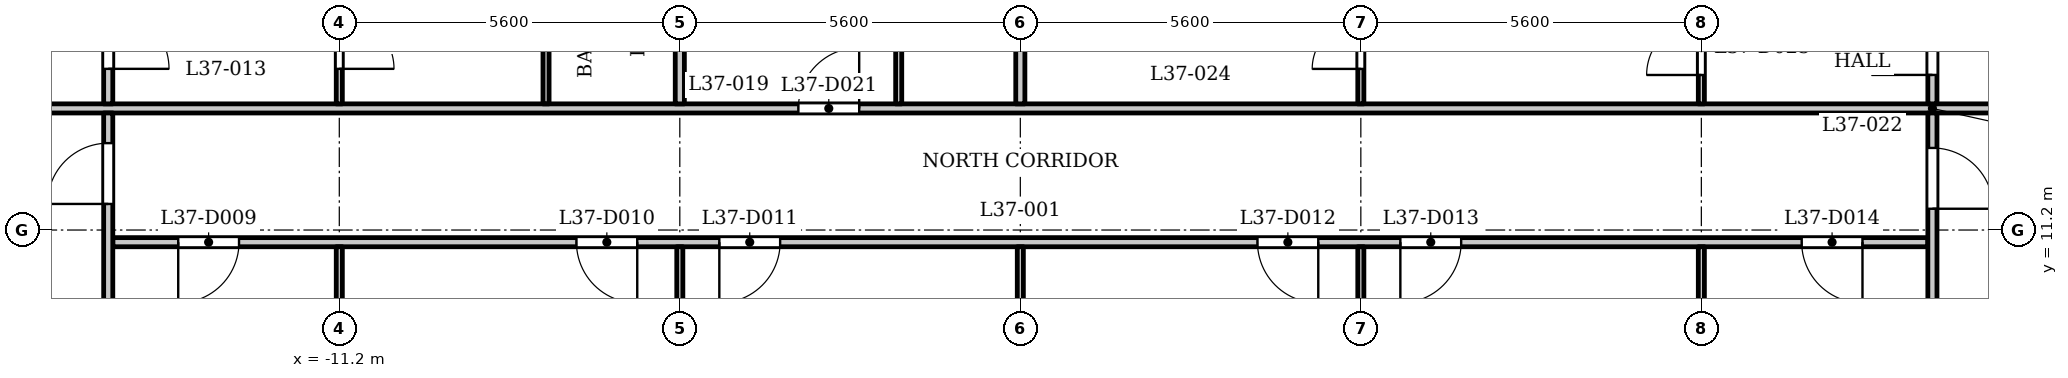
"""IFC4 building model, lengths in metres.
Left out: names, types, materials, properties, quantities, classifications, styles, units other than length and angle.
Written with IfcOpenShell. Run it as: python <this file> out.ifc"""

import sys

from ifc_helpers import new_model, si_unit, direction, frame, frame_2d, origin, place, context, subcontext, project, spatial, rectangle, extrude, element, fill, save


model = new_model("IFC4")
c1 = context("Model", 3, precision=1e-05, world=origin(), true_north=direction((0.0, 1.0)))
c2 = subcontext(c1, "Body", "Model", "MODEL_VIEW")
j1 = project(units=[si_unit("LENGTHUNIT", "METRE"), si_unit("PLANEANGLEUNIT", "RADIAN")], contexts=[c1])
p1 = place(None, origin())
s1 = spatial("IfcSite", under=j1, at=p1, CompositionType="ELEMENT")
p2 = place(p1, origin())
s2 = spatial("IfcBuilding", under=s1, at=p2, CompositionType="ELEMENT")
p3 = place(p2, frame((0.0, 0.0, 146.6)))
s3 = spatial("IfcBuildingStorey", under=s2, at=p3, CompositionType="ELEMENT", Elevation=146.6)
p4 = place(p3, frame((-14.925, 11.0, 0.0), z_axis=(0.0, 0.0, 1.0), x_axis=(1.0, 0.0, 0.0)))
e1 = element("IfcWall", 1, at=p4, inside=s3, PredefinedType="PARTITIONING", context=c2, shape_type="SweptSolid", body=[
    extrude(rectangle(XDim=29.85, YDim=0.15, at=frame_2d((14.925, 0.0))), origin(), (0.0, 0.0, 1.0), 3.2),
])
p5 = place(p4, frame((1.076, 0.0, 0.0)))
e2 = element("IfcOpeningElement", 2, at=p5, cuts=e1, PredefinedType="OPENING", context=c2, shape_type="SweptSolid", body=[
    extrude(rectangle(XDim=1.0, YDim=2.1, at=frame_2d((0.5, 1.05))), frame((0.0, 0.085, 0.0), z_axis=(0.0, -1.0, 0.0), x_axis=(1.0, 0.0, 0.0)), (0.0, 0.0, 1.0), 0.17),
])
p6 = place(p4, frame((7.625, 0.0, 0.0)))
e3 = element("IfcOpeningElement", 3, at=p6, cuts=e1, PredefinedType="OPENING", context=c2, shape_type="SweptSolid", body=[
    extrude(rectangle(XDim=1.0, YDim=2.1, at=frame_2d((0.5, 1.05))), frame((0.0, 0.085, 0.0), z_axis=(0.0, -1.0, 0.0), x_axis=(1.0, 0.0, 0.0)), (0.0, 0.0, 1.0), 0.17),
])
p7 = place(p4, frame((9.975, 0.0, 0.0)))
e4 = element("IfcOpeningElement", 4, at=p7, cuts=e1, PredefinedType="OPENING", context=c2, shape_type="SweptSolid", body=[
    extrude(rectangle(XDim=1.0, YDim=2.1, at=frame_2d((0.5, 1.05))), frame((0.0, 0.085, 0.0), z_axis=(0.0, -1.0, 0.0), x_axis=(1.0, 0.0, 0.0)), (0.0, 0.0, 1.0), 0.17),
])
p8 = place(p4, frame((18.825, 0.0, 0.0)))
e5 = element("IfcOpeningElement", 5, at=p8, cuts=e1, PredefinedType="OPENING", context=c2, shape_type="SweptSolid", body=[
    extrude(rectangle(XDim=1.0, YDim=2.1, at=frame_2d((0.5, 1.05))), frame((0.0, 0.085, 0.0), z_axis=(0.0, -1.0, 0.0), x_axis=(1.0, 0.0, 0.0)), (0.0, 0.0, 1.0), 0.17),
])
p9 = place(p4, frame((21.175, 0.0, 0.0)))
e6 = element("IfcOpeningElement", 6, at=p9, cuts=e1, PredefinedType="OPENING", context=c2, shape_type="SweptSolid", body=[
    extrude(rectangle(XDim=1.0, YDim=2.1, at=frame_2d((0.5, 1.05))), frame((0.0, 0.085, 0.0), z_axis=(0.0, -1.0, 0.0), x_axis=(1.0, 0.0, 0.0)), (0.0, 0.0, 1.0), 0.17),
])
p10 = place(p4, frame((27.775, 0.0, 0.0)))
e7 = element("IfcOpeningElement", 7, at=p10, cuts=e1, PredefinedType="OPENING", context=c2, shape_type="SweptSolid", body=[
    extrude(rectangle(XDim=1.0, YDim=2.1, at=frame_2d((0.5, 1.05))), frame((0.0, 0.085, 0.0), z_axis=(0.0, -1.0, 0.0), x_axis=(1.0, 0.0, 0.0)), (0.0, 0.0, 1.0), 0.17),
])
p11 = place(p3, frame((-17.4, 13.2, 0.0), z_axis=(0.0, 0.0, 1.0), x_axis=(1.0, 0.0, 0.0)))
e8 = element("IfcWall", 8, at=p11, inside=s3, PredefinedType="PARTITIONING", context=c2, shape_type="SweptSolid", body=[
    extrude(rectangle(XDim=34.8, YDim=0.15, at=frame_2d((17.4, 0.0))), origin(), (0.0, 0.0, 1.0), 3.2),
])
p12 = place(p11, frame((0.25, 0.0, 0.0)))
e9 = element("IfcOpeningElement", 9, at=p12, cuts=e8, PredefinedType="OPENING", context=c2, shape_type="SweptSolid", body=[
    extrude(rectangle(XDim=1.0, YDim=2.1, at=frame_2d((0.5, 1.05))), frame((0.0, 0.085, 0.0), z_axis=(0.0, -1.0, 0.0), x_axis=(1.0, 0.0, 0.0)), (0.0, 0.0, 1.0), 0.17),
])
p13 = place(p11, frame((33.65, 0.0, 0.0)))
e10 = element("IfcOpeningElement", 10, at=p13, cuts=e8, PredefinedType="OPENING", context=c2, shape_type="SweptSolid", body=[
    extrude(rectangle(XDim=1.0, YDim=2.1, at=frame_2d((0.5, 1.05))), frame((0.0, 0.085, 0.0), z_axis=(0.0, -1.0, 0.0), x_axis=(1.0, 0.0, 0.0)), (0.0, 0.0, 1.0), 0.17),
])
p14 = place(p11, frame((13.75, 0.0, 0.0)))
e11 = element("IfcOpeningElement", 11, at=p14, cuts=e8, PredefinedType="OPENING", context=c2, shape_type="SweptSolid", body=[
    extrude(rectangle(XDim=1.0, YDim=2.1, at=frame_2d((0.5, 1.05))), frame((0.0, 0.085, 0.0), z_axis=(0.0, -1.0, 0.0), x_axis=(1.0, 0.0, 0.0)), (0.0, 0.0, 1.0), 0.17),
])
p15 = place(p3, frame((-15.0, 6.769, 0.0), z_axis=(0.0, 0.0, 1.0), x_axis=(0.0, 1.0, 0.0)))
e12 = element("IfcWall", 12, at=p15, inside=s3, PredefinedType="PARTITIONING", context=c2, shape_type="SweptSolid", body=[
    extrude(rectangle(XDim=6.356, YDim=0.15, at=frame_2d((3.178, 0.0))), origin(), (0.0, 0.0, 1.0), 3.2),
])
p16 = place(p15, frame((4.86, 0.0, 0.0)))
e13 = element("IfcOpeningElement", 13, at=p16, cuts=e12, PredefinedType="OPENING", context=c2, shape_type="SweptSolid", body=[
    extrude(rectangle(XDim=1.0, YDim=2.1, at=frame_2d((0.5, 1.05))), frame((0.0, 0.085, 0.0), z_axis=(0.0, -1.0, 0.0), x_axis=(1.0, 0.0, 0.0)), (0.0, 0.0, 1.0), 0.17),
])
p17 = place(p3, frame((-15.0, 13.275, 0.0), z_axis=(0.0, 0.0, 1.0), x_axis=(0.0, 1.0, 0.0)))
e14 = element("IfcWall", 14, at=p17, inside=s3, PredefinedType="PARTITIONING", context=c2, shape_type="SweptSolid", body=[
    extrude(rectangle(XDim=2.05, YDim=0.15, at=frame_2d((1.025, 0.0))), origin(), (0.0, 0.0, 1.0), 3.2),
])
p18 = place(p17, frame((0.576, 0.0, 0.0)))
e15 = element("IfcOpeningElement", 15, at=p18, cuts=e14, PredefinedType="OPENING", context=c2, shape_type="SweptSolid", body=[
    extrude(rectangle(XDim=1.0, YDim=2.1, at=frame_2d((0.5, 1.05))), frame((0.0, 0.085, 0.0), z_axis=(0.0, -1.0, 0.0), x_axis=(1.0, 0.0, 0.0)), (0.0, 0.0, 1.0), 0.17),
])
p19 = place(p3, frame((-11.2, 7.32, 0.0), z_axis=(0.0, 0.0, 1.0), x_axis=(0.0, 1.0, 0.0)))
e16 = element("IfcWall", 16, at=p19, inside=s3, PredefinedType="PARTITIONING", context=c2, shape_type="SweptSolid", body=[
    extrude(rectangle(XDim=3.605, YDim=0.1, at=frame_2d((1.802, 0.0))), origin(), (0.0, 0.0, 1.0), 3.2),
])
p20 = place(p3, frame((-11.2, 13.275, 0.0), z_axis=(0.0, 0.0, 1.0), x_axis=(0.0, 1.0, 0.0)))
e17 = element("IfcWall", 17, at=p20, inside=s3, PredefinedType="PARTITIONING", context=c2, shape_type="SweptSolid", body=[
    extrude(rectangle(XDim=3.475, YDim=0.1, at=frame_2d((1.738, 0.0))), origin(), (0.0, 0.0, 1.0), 3.2),
])
p21 = place(p20, frame((0.576, 0.0, 0.0)))
e18 = element("IfcOpeningElement", 18, at=p21, cuts=e17, PredefinedType="OPENING", context=c2, shape_type="SweptSolid", body=[
    extrude(rectangle(XDim=0.9, YDim=2.1, at=frame_2d((0.45, 1.05))), frame((0.0, 0.06, 0.0), z_axis=(0.0, -1.0, 0.0), x_axis=(1.0, 0.0, 0.0)), (0.0, 0.0, 1.0), 0.12),
])
p22 = place(p3, frame((-7.8, 13.275, 0.0), z_axis=(0.0, 0.0, 1.0), x_axis=(0.0, 1.0, 0.0)))
e19 = element("IfcWall", 19, at=p22, inside=s3, PredefinedType="PARTITIONING", context=c2, shape_type="SweptSolid", body=[
    extrude(rectangle(XDim=3.475, YDim=0.1, at=frame_2d((1.738, 0.0))), origin(), (0.0, 0.0, 1.0), 3.2),
])
p23 = place(p3, frame((-5.6, 7.32, 0.0), z_axis=(0.0, 0.0, 1.0), x_axis=(0.0, 1.0, 0.0)))
e20 = element("IfcWall", 20, at=p23, inside=s3, PredefinedType="PARTITIONING", context=c2, shape_type="SweptSolid", body=[
    extrude(rectangle(XDim=3.605, YDim=0.1, at=frame_2d((1.802, 0.0))), origin(), (0.0, 0.0, 1.0), 3.2),
])
p24 = place(p3, frame((-5.6, 13.275, 0.0), z_axis=(0.0, 0.0, 1.0), x_axis=(0.0, 1.0, 0.0)))
e21 = element("IfcWall", 21, at=p24, inside=s3, PredefinedType="PARTITIONING", context=c2, shape_type="SweptSolid", body=[
    extrude(rectangle(XDim=3.475, YDim=0.15, at=frame_2d((1.738, 0.0))), origin(), (0.0, 0.0, 1.0), 3.2),
])
p25 = place(p3, frame((-2.0, 13.275, 0.0), z_axis=(0.0, 0.0, 1.0), x_axis=(0.0, 1.0, 0.0)))
e22 = element("IfcWall", 22, at=p25, inside=s3, PredefinedType="PARTITIONING", context=c2, shape_type="SweptSolid", body=[
    extrude(rectangle(XDim=3.475, YDim=0.1, at=frame_2d((1.738, 0.0))), origin(), (0.0, 0.0, 1.0), 3.2),
])
p26 = place(p3, frame((0.0, 7.32, 0.0), z_axis=(0.0, 0.0, 1.0), x_axis=(0.0, 1.0, 0.0)))
e23 = element("IfcWall", 23, at=p26, inside=s3, PredefinedType="PARTITIONING", context=c2, shape_type="SweptSolid", body=[
    extrude(rectangle(XDim=3.605, YDim=0.1, at=frame_2d((1.802, 0.0))), origin(), (0.0, 0.0, 1.0), 3.2),
])
p27 = place(p3, frame((0.0, 13.275, 0.0), z_axis=(0.0, 0.0, 1.0), x_axis=(0.0, 1.0, 0.0)))
e24 = element("IfcWall", 24, at=p27, inside=s3, PredefinedType="PARTITIONING", context=c2, shape_type="SweptSolid", body=[
    extrude(rectangle(XDim=3.475, YDim=0.15, at=frame_2d((1.738, 0.0))), origin(), (0.0, 0.0, 1.0), 3.2),
])
p28 = place(p3, frame((5.6, 7.32, 0.0), z_axis=(0.0, 0.0, 1.0), x_axis=(0.0, 1.0, 0.0)))
e25 = element("IfcWall", 25, at=p28, inside=s3, PredefinedType="PARTITIONING", context=c2, shape_type="SweptSolid", body=[
    extrude(rectangle(XDim=3.605, YDim=0.1, at=frame_2d((1.802, 0.0))), origin(), (0.0, 0.0, 1.0), 3.2),
])
p29 = place(p3, frame((5.6, 13.275, 0.0), z_axis=(0.0, 0.0, 1.0), x_axis=(0.0, 1.0, 0.0)))
e26 = element("IfcWall", 26, at=p29, inside=s3, PredefinedType="PARTITIONING", context=c2, shape_type="SweptSolid", body=[
    extrude(rectangle(XDim=3.475, YDim=0.1, at=frame_2d((1.738, 0.0))), origin(), (0.0, 0.0, 1.0), 3.2),
])
p30 = place(p29, frame((0.575, 0.0, 0.0)))
e27 = element("IfcOpeningElement", 27, at=p30, cuts=e26, PredefinedType="OPENING", context=c2, shape_type="SweptSolid", body=[
    extrude(rectangle(XDim=0.8, YDim=2.1, at=frame_2d((0.4, 1.05))), frame((0.0, 0.06, 0.0), z_axis=(0.0, -1.0, 0.0), x_axis=(1.0, 0.0, 0.0)), (0.0, 0.0, 1.0), 0.12),
])
p31 = place(p3, frame((11.2, 7.32, 0.0), z_axis=(0.0, 0.0, 1.0), x_axis=(0.0, 1.0, 0.0)))
e28 = element("IfcWall", 28, at=p31, inside=s3, PredefinedType="PARTITIONING", context=c2, shape_type="SweptSolid", body=[
    extrude(rectangle(XDim=3.605, YDim=0.1, at=frame_2d((1.802, 0.0))), origin(), (0.0, 0.0, 1.0), 3.2),
])
p32 = place(p3, frame((11.2, 13.275, 0.0), z_axis=(0.0, 0.0, 1.0), x_axis=(0.0, 1.0, 0.0)))
e29 = element("IfcWall", 29, at=p32, inside=s3, PredefinedType="PARTITIONING", context=c2, shape_type="SweptSolid", body=[
    extrude(rectangle(XDim=3.475, YDim=0.1, at=frame_2d((1.738, 0.0))), origin(), (0.0, 0.0, 1.0), 3.2),
])
p33 = place(p32, frame((0.475, 0.0, 0.0)))
e30 = element("IfcOpeningElement", 30, at=p33, cuts=e29, PredefinedType="OPENING", context=c2, shape_type="SweptSolid", body=[
    extrude(rectangle(XDim=0.9, YDim=2.1, at=frame_2d((0.45, 1.05))), frame((0.0, 0.06, 0.0), z_axis=(0.0, -1.0, 0.0), x_axis=(1.0, 0.0, 0.0)), (0.0, 0.0, 1.0), 0.12),
])
p34 = place(p3, frame((15.0, 6.769, 0.0), z_axis=(0.0, 0.0, 1.0), x_axis=(0.0, 1.0, 0.0)))
e31 = element("IfcWall", 31, at=p34, inside=s3, PredefinedType="PARTITIONING", context=c2, shape_type="SweptSolid", body=[
    extrude(rectangle(XDim=6.356, YDim=0.15, at=frame_2d((3.178, 0.0))), origin(), (0.0, 0.0, 1.0), 3.2),
])
p35 = place(p34, frame((4.781, 0.0, 0.0)))
e32 = element("IfcOpeningElement", 32, at=p35, cuts=e31, PredefinedType="OPENING", context=c2, shape_type="SweptSolid", body=[
    extrude(rectangle(XDim=1.0, YDim=2.1, at=frame_2d((0.5, 1.05))), frame((0.0, 0.085, 0.0), z_axis=(0.0, -1.0, 0.0), x_axis=(1.0, 0.0, 0.0)), (0.0, 0.0, 1.0), 0.17),
])
p36 = place(p3, frame((15.0, 13.275, 0.0), z_axis=(0.0, 0.0, 1.0), x_axis=(0.0, 1.0, 0.0)))
e33 = element("IfcWall", 33, at=p36, inside=s3, PredefinedType="PARTITIONING", context=c2, shape_type="SweptSolid", body=[
    extrude(rectangle(XDim=2.05, YDim=0.15, at=frame_2d((1.025, 0.0))), origin(), (0.0, 0.0, 1.0), 3.2),
])
p37 = place(p36, frame((0.476, 0.0, 0.0)))
e34 = element("IfcOpeningElement", 34, at=p37, cuts=e33, PredefinedType="OPENING", context=c2, shape_type="SweptSolid", body=[
    extrude(rectangle(XDim=1.0, YDim=2.1, at=frame_2d((0.5, 1.05))), frame((0.0, 0.085, 0.0), z_axis=(0.0, -1.0, 0.0), x_axis=(1.0, 0.0, 0.0)), (0.0, 0.0, 1.0), 0.17),
])
p38 = place(p16, origin())
e35 = element("IfcDoor", 35, at=p38, inside=s3, OperationType="SINGLE_SWING_RIGHT", PredefinedType="DOOR", context=c2, shape_type="SweptSolid", body=[
    extrude(rectangle(XDim=1.0, YDim=2.1, at=frame_2d((0.5, 1.05))), frame((0.0, 0.025, 0.0), z_axis=(0.0, -1.0, 0.0), x_axis=(1.0, 0.0, 0.0)), (0.0, 0.0, 1.0), 0.05),
])
fill(e13, e35)
p39 = place(p35, origin())
e36 = element("IfcDoor", 36, at=p39, inside=s3, OperationType="SINGLE_SWING_LEFT", PredefinedType="DOOR", context=c2, shape_type="SweptSolid", body=[
    extrude(rectangle(XDim=1.0, YDim=2.1, at=frame_2d((0.5, 1.05))), frame((0.0, 0.025, 0.0), z_axis=(0.0, -1.0, 0.0), x_axis=(1.0, 0.0, 0.0)), (0.0, 0.0, 1.0), 0.05),
])
fill(e32, e36)
p40 = place(p5, origin())
e37 = element("IfcDoor", 37, at=p40, inside=s3, OperationType="SINGLE_SWING_LEFT", PredefinedType="DOOR", context=c2, shape_type="SweptSolid", body=[
    extrude(rectangle(XDim=1.0, YDim=2.1, at=frame_2d((0.5, 1.05))), frame((0.0, 0.025, 0.0), z_axis=(0.0, -1.0, 0.0), x_axis=(1.0, 0.0, 0.0)), (0.0, 0.0, 1.0), 0.05),
])
fill(e2, e37)
p41 = place(p6, origin())
e38 = element("IfcDoor", 38, at=p41, inside=s3, OperationType="SINGLE_SWING_RIGHT", PredefinedType="DOOR", context=c2, shape_type="SweptSolid", body=[
    extrude(rectangle(XDim=1.0, YDim=2.1, at=frame_2d((0.5, 1.05))), frame((0.0, 0.025, 0.0), z_axis=(0.0, -1.0, 0.0), x_axis=(1.0, 0.0, 0.0)), (0.0, 0.0, 1.0), 0.05),
])
fill(e3, e38)
p42 = place(p7, origin())
e39 = element("IfcDoor", 39, at=p42, inside=s3, OperationType="SINGLE_SWING_LEFT", PredefinedType="DOOR", context=c2, shape_type="SweptSolid", body=[
    extrude(rectangle(XDim=1.0, YDim=2.1, at=frame_2d((0.5, 1.05))), frame((0.0, 0.025, 0.0), z_axis=(0.0, -1.0, 0.0), x_axis=(1.0, 0.0, 0.0)), (0.0, 0.0, 1.0), 0.05),
])
fill(e4, e39)
p43 = place(p8, origin())
e40 = element("IfcDoor", 40, at=p43, inside=s3, OperationType="SINGLE_SWING_RIGHT", PredefinedType="DOOR", context=c2, shape_type="SweptSolid", body=[
    extrude(rectangle(XDim=1.0, YDim=2.1, at=frame_2d((0.5, 1.05))), frame((0.0, 0.025, 0.0), z_axis=(0.0, -1.0, 0.0), x_axis=(1.0, 0.0, 0.0)), (0.0, 0.0, 1.0), 0.05),
])
fill(e5, e40)
p44 = place(p9, origin())
e41 = element("IfcDoor", 41, at=p44, inside=s3, OperationType="SINGLE_SWING_LEFT", PredefinedType="DOOR", context=c2, shape_type="SweptSolid", body=[
    extrude(rectangle(XDim=1.0, YDim=2.1, at=frame_2d((0.5, 1.05))), frame((0.0, 0.025, 0.0), z_axis=(0.0, -1.0, 0.0), x_axis=(1.0, 0.0, 0.0)), (0.0, 0.0, 1.0), 0.05),
])
fill(e6, e41)
p45 = place(p10, origin())
e42 = element("IfcDoor", 42, at=p45, inside=s3, OperationType="SINGLE_SWING_RIGHT", PredefinedType="DOOR", context=c2, shape_type="SweptSolid", body=[
    extrude(rectangle(XDim=1.0, YDim=2.1, at=frame_2d((0.5, 1.05))), frame((0.0, 0.025, 0.0), z_axis=(0.0, -1.0, 0.0), x_axis=(1.0, 0.0, 0.0)), (0.0, 0.0, 1.0), 0.05),
])
fill(e7, e42)
p46 = place(p18, origin())
e43 = element("IfcDoor", 43, at=p46, inside=s3, OperationType="SINGLE_SWING_LEFT", PredefinedType="DOOR", context=c2, shape_type="SweptSolid", body=[
    extrude(rectangle(XDim=1.0, YDim=2.1, at=frame_2d((0.5, 1.05))), frame((0.0, 0.025, 0.0), z_axis=(0.0, -1.0, 0.0), x_axis=(1.0, 0.0, 0.0)), (0.0, 0.0, 1.0), 0.05),
])
fill(e15, e43)
p47 = place(p21, origin())
e44 = element("IfcDoor", 44, at=p47, inside=s3, OperationType="SINGLE_SWING_LEFT", PredefinedType="DOOR", context=c2, shape_type="SweptSolid", body=[
    extrude(rectangle(XDim=0.9, YDim=2.1, at=frame_2d((0.45, 1.05))), frame((0.0, 0.025, 0.0), z_axis=(0.0, -1.0, 0.0), x_axis=(1.0, 0.0, 0.0)), (0.0, 0.0, 1.0), 0.05),
])
fill(e18, e44)
p48 = place(p14, origin())
e45 = element("IfcDoor", 45, at=p48, inside=s3, OperationType="SINGLE_SWING_LEFT", PredefinedType="DOOR", context=c2, shape_type="SweptSolid", body=[
    extrude(rectangle(XDim=1.0, YDim=2.1, at=frame_2d((0.5, 1.05))), frame((0.0, 0.025, 0.0), z_axis=(0.0, -1.0, 0.0), x_axis=(1.0, 0.0, 0.0)), (0.0, 0.0, 1.0), 0.05),
])
fill(e11, e45)
p49 = place(p37, origin())
e46 = element("IfcDoor", 46, at=p49, inside=s3, OperationType="SINGLE_SWING_RIGHT", PredefinedType="DOOR", context=c2, shape_type="SweptSolid", body=[
    extrude(rectangle(XDim=1.0, YDim=2.1, at=frame_2d((0.5, 1.05))), frame((0.0, 0.025, 0.0), z_axis=(0.0, -1.0, 0.0), x_axis=(1.0, 0.0, 0.0)), (0.0, 0.0, 1.0), 0.05),
])
fill(e34, e46)
p50 = place(p33, origin())
e47 = element("IfcDoor", 47, at=p50, inside=s3, OperationType="SINGLE_SWING_RIGHT", PredefinedType="DOOR", context=c2, shape_type="SweptSolid", body=[
    extrude(rectangle(XDim=0.9, YDim=2.1, at=frame_2d((0.45, 1.05))), frame((0.0, 0.025, 0.0), z_axis=(0.0, -1.0, 0.0), x_axis=(1.0, 0.0, 0.0)), (0.0, 0.0, 1.0), 0.05),
])
fill(e30, e47)
p51 = place(p30, origin())
e48 = element("IfcDoor", 48, at=p51, inside=s3, OperationType="SINGLE_SWING_RIGHT", PredefinedType="DOOR", context=c2, shape_type="SweptSolid", body=[
    extrude(rectangle(XDim=0.8, YDim=2.1, at=frame_2d((0.4, 1.05))), frame((0.0, 0.025, 0.0), z_axis=(0.0, -1.0, 0.0), x_axis=(1.0, 0.0, 0.0)), (0.0, 0.0, 1.0), 0.05),
])
fill(e27, e48)
save(model, sys.argv[1])
